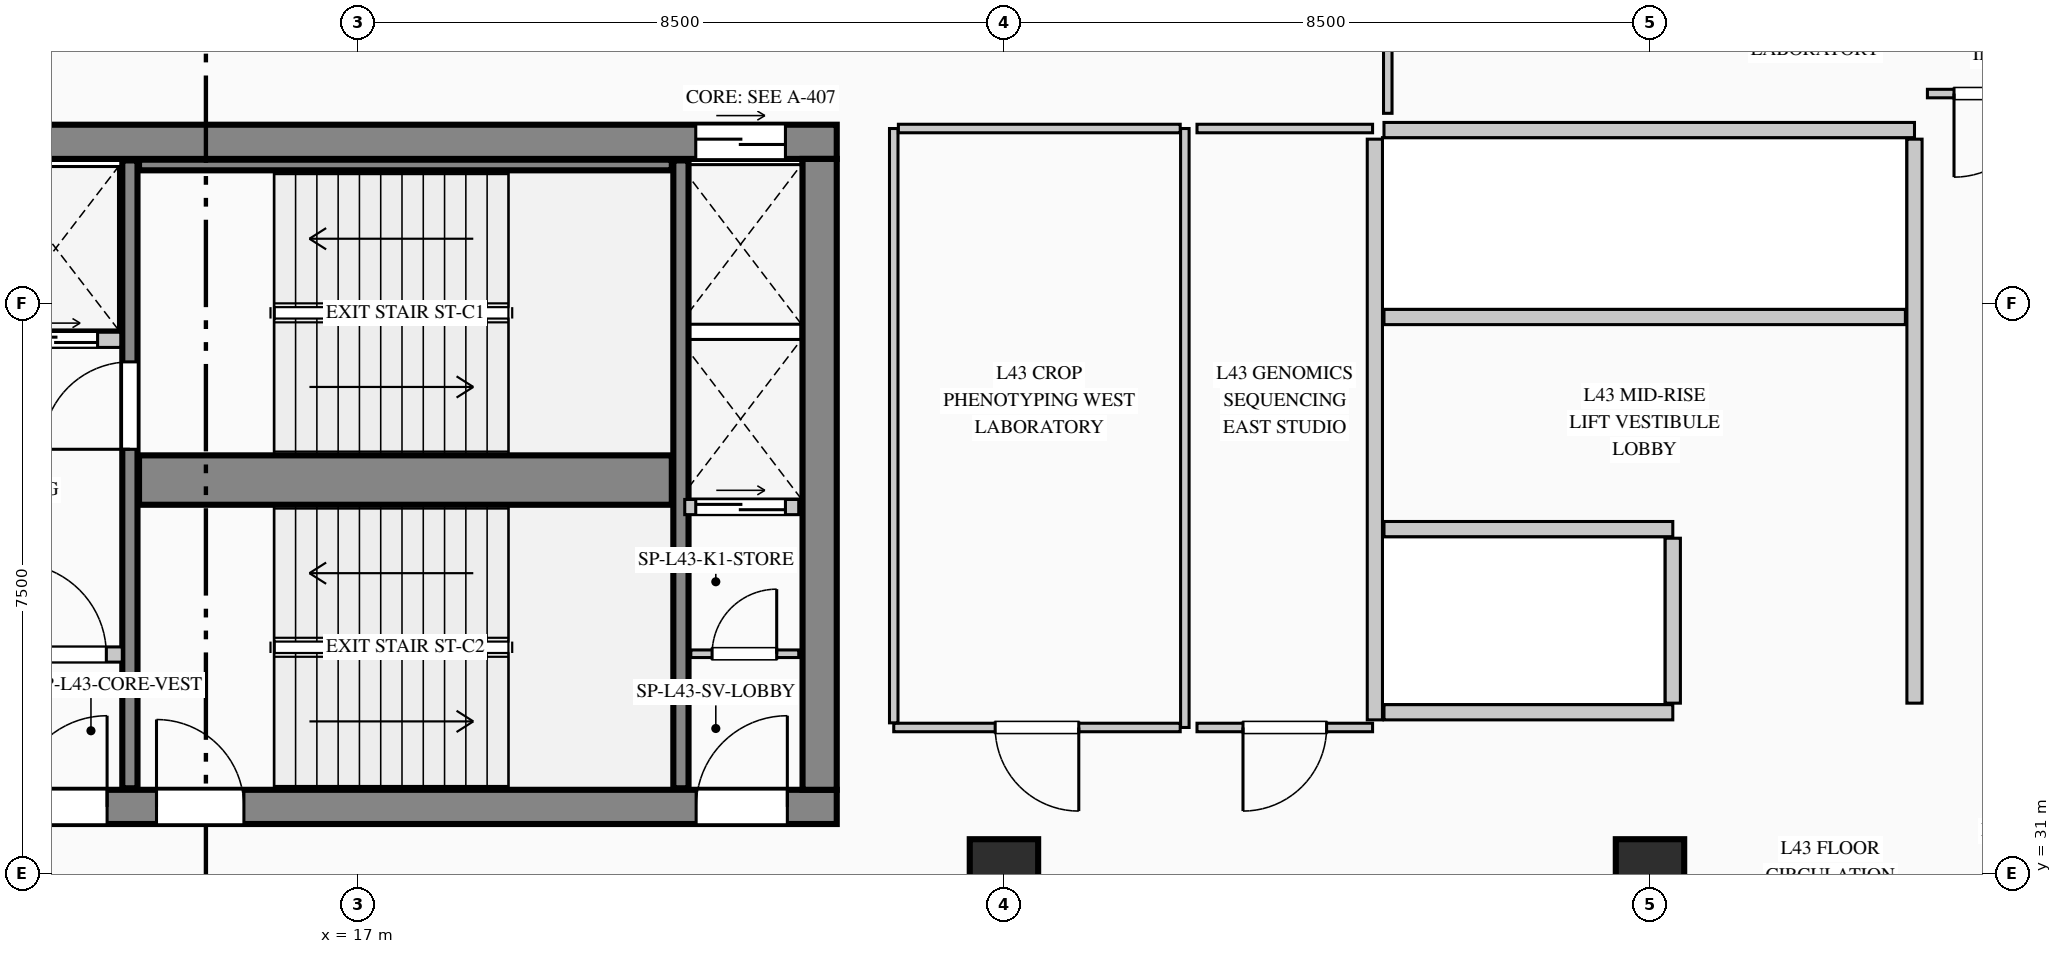
"""IFC4 building model, lengths in metres.
Left out: names, types, materials, properties, quantities, classifications, styles, units other than length and angle.
Written with IfcOpenShell. Run it as: python <this file> out.ifc"""

import sys

from ifc_helpers import new_model, si_unit, direction, frame, frame_2d, origin, origin_2d, place, context, subcontext, project, spatial, rectangle, extrude, element, fill, save


model = new_model("IFC4")
c1 = context("Model", 3, precision=1e-05, world=origin(), true_north=direction((0.0, 1.0)))
c2 = subcontext(c1, "Body", "Model", "MODEL_VIEW")
j1 = project(units=[si_unit("LENGTHUNIT", "METRE"), si_unit("PLANEANGLEUNIT", "RADIAN")], contexts=[c1])
p1 = place(None, origin())
s1 = spatial("IfcSite", under=j1, at=p1, CompositionType="ELEMENT")
p2 = place(p1, origin())
s2 = spatial("IfcBuilding", under=s1, at=p2, CompositionType="ELEMENT")
p3 = place(p2, frame((0.0, 0.0, 183.75)))
s3 = spatial("IfcBuildingStorey", under=s2, at=p3, CompositionType="ELEMENT", Elevation=183.75)
p4 = place(p3, frame((5.55, 40.625, 0.0), z_axis=(0.0, 0.0, 1.0), x_axis=(1.0, 0.0, 0.0)))
e1 = element("IfcWall", 1, at=p4, inside=s3, PredefinedType="SHEAR", context=c2, shape_type="SweptSolid", body=[
    extrude(rectangle(XDim=17.75, YDim=0.45, at=frame_2d((8.875, 0.0))), origin(), (0.0, 0.0, 1.0), 3.95),
])
p5 = place(p4, frame((15.895, 0.0, 0.0)))
e2 = element("IfcOpeningElement", 2, at=p5, cuts=e1, PredefinedType="OPENING", context=c2, shape_type="SweptSolid", body=[
    extrude(rectangle(XDim=1.18, YDim=2.25, at=frame_2d((0.59, 1.125))), frame((0.0, 0.235, 0.0), z_axis=(0.0, -1.0, 0.0), x_axis=(1.0, 0.0, 0.0)), (0.0, 0.0, 1.0), 0.47),
])
p6 = place(p3, frame((5.55, 31.875, 0.0), z_axis=(0.0, 0.0, 1.0), x_axis=(1.0, 0.0, 0.0)))
e3 = element("IfcWall", 3, at=p6, inside=s3, PredefinedType="SHEAR", context=c2, shape_type="SweptSolid", body=[
    extrude(rectangle(XDim=17.75, YDim=0.45, at=frame_2d((8.875, 0.0))), origin(), (0.0, 0.0, 1.0), 3.95),
])
p7 = place(p6, frame((3.1, 0.0, 0.0)))
e4 = element("IfcOpeningElement", 4, at=p7, cuts=e3, PredefinedType="OPENING", context=c2, shape_type="SweptSolid", body=[
    extrude(rectangle(XDim=1.2, YDim=2.2, at=frame_2d((0.6, 1.1))), frame((0.0, 0.235, 0.0), z_axis=(0.0, -1.0, 0.0), x_axis=(1.0, 0.0, 0.0)), (0.0, 0.0, 1.0), 0.47),
])
p8 = place(p6, frame((6.95, 0.0, 0.0)))
e5 = element("IfcOpeningElement", 5, at=p8, cuts=e3, PredefinedType="OPENING", context=c2, shape_type="SweptSolid", body=[
    extrude(rectangle(XDim=1.2, YDim=2.2, at=frame_2d((0.6, 1.1))), frame((0.0, 0.235, 0.0), z_axis=(0.0, -1.0, 0.0), x_axis=(1.0, 0.0, 0.0)), (0.0, 0.0, 1.0), 0.47),
])
p9 = place(p6, frame((8.8, 0.0, 0.0)))
e6 = element("IfcOpeningElement", 6, at=p9, cuts=e3, PredefinedType="OPENING", context=c2, shape_type="SweptSolid", body=[
    extrude(rectangle(XDim=1.15, YDim=2.2, at=frame_2d((0.575, 1.1))), frame((0.0, 0.235, 0.0), z_axis=(0.0, -1.0, 0.0), x_axis=(1.0, 0.0, 0.0)), (0.0, 0.0, 1.0), 0.47),
])
p10 = place(p6, frame((15.9, 0.0, 0.0)))
e7 = element("IfcOpeningElement", 7, at=p10, cuts=e3, PredefinedType="OPENING", context=c2, shape_type="SweptSolid", body=[
    extrude(rectangle(XDim=1.2, YDim=2.2, at=frame_2d((0.6, 1.1))), frame((0.0, 0.235, 0.0), z_axis=(0.0, -1.0, 0.0), x_axis=(1.0, 0.0, 0.0)), (0.0, 0.0, 1.0), 0.47),
])
p11 = place(p3, frame((23.075, 32.1, 0.0), z_axis=(0.0, 0.0, 1.0), x_axis=(0.0, 1.0, 0.0)))
e8 = element("IfcWall", 8, at=p11, inside=s3, PredefinedType="SHEAR", context=c2, shape_type="SweptSolid", body=[
    extrude(rectangle(XDim=8.3, YDim=0.45, at=frame_2d((4.15, 0.0))), origin(), (0.0, 0.0, 1.0), 3.95),
])
p12 = place(p3, frame((14.0, 32.12, 0.0), z_axis=(0.0, 0.0, 1.0), x_axis=(0.0, 1.0, 0.0)))
e9 = element("IfcWall", 9, at=p12, inside=s3, PredefinedType="SHEAR", context=c2, shape_type="SweptSolid", body=[
    extrude(rectangle(XDim=8.26, YDim=0.2, at=frame_2d((4.13, 0.0))), origin(), (0.0, 0.0, 1.0), 3.95),
])
p13 = place(p12, frame((4.46, 0.0, 0.0)))
e10 = element("IfcOpeningElement", 10, at=p13, cuts=e9, PredefinedType="OPENING", context=c2, shape_type="SweptSolid", body=[
    extrude(rectangle(XDim=1.15, YDim=2.2, at=frame_2d((0.575, 1.1))), frame((0.0, 0.11, 0.0), z_axis=(0.0, -1.0, 0.0), x_axis=(1.0, 0.0, 0.0)), (0.0, 0.0, 1.0), 0.22),
])
p14 = place(p3, frame((14.12, 36.175, 0.0), z_axis=(0.0, 0.0, 1.0), x_axis=(1.0, 0.0, 0.0)))
e11 = element("IfcWall", 11, at=p14, inside=s3, PredefinedType="SHEAR", context=c2, shape_type="SweptSolid", body=[
    extrude(rectangle(XDim=7.01, YDim=0.65, at=frame_2d((3.505, 0.0))), origin(), (0.0, 0.0, 1.0), 3.95),
])
p15 = place(p3, frame((21.25, 32.12, 0.0), z_axis=(0.0, 0.0, 1.0), x_axis=(0.0, 1.0, 0.0)))
e12 = element("IfcWall", 12, at=p15, inside=s3, PredefinedType="SHEAR", context=c2, shape_type="SweptSolid", body=[
    extrude(rectangle(XDim=8.26, YDim=0.2, at=frame_2d((4.13, 0.0))), origin(), (0.0, 0.0, 1.0), 3.95),
])
p16 = place(p3, frame((14.12, 40.32, 0.0), z_axis=(0.0, 0.0, 1.0), x_axis=(1.0, 0.0, 0.0)))
e13 = element("IfcWall", 13, at=p16, inside=s3, PredefinedType="SHEAR", context=c2, shape_type="SweptSolid", body=[
    extrude(rectangle(XDim=7.01, YDim=0.14, at=frame_2d((3.505, 0.0))), origin(), (0.0, 0.0, 1.0), 3.95),
])
for number, where, z_axis, x_axis in (
    (14, (25.5, 31.0, 0.0), (0.0, 0.0, 1.0), (1.0, 0.0, 0.0)),
    (15, (34.0, 31.0, 0.0), (0.0, 0.0, 1.0), (1.0, 0.0, 0.0)),
):
    element("IfcColumn", number, at=place(p3, frame(where, z_axis=z_axis, x_axis=x_axis)), inside=s3, PredefinedType="COLUMN", context=c2, shape_type="SweptSolid", body=[
        extrude(rectangle(XDim=0.9, YDim=0.9, at=origin_2d()), origin(), (0.0, 0.0, 1.0), 3.95),
    ])
p17 = place(p3, frame((10.34, 38.02, 0.0), z_axis=(0.0, 0.0, 1.0), x_axis=(1.0, 0.0, 0.0)))
e16 = element("IfcWall", 16, at=p17, inside=s3, PredefinedType="PARTITIONING", context=c2, shape_type="SweptSolid", body=[
    extrude(rectangle(XDim=3.54, YDim=0.2, at=frame_2d((1.77, 0.0))), origin(), (0.0, 0.0, 1.0), 3.7),
])
p18 = place(p17, frame((0.285, 0.0, 0.0)))
e17 = element("IfcOpeningElement", 17, at=p18, cuts=e16, PredefinedType="OPENING", context=c2, shape_type="SweptSolid", body=[
    extrude(rectangle(XDim=1.1, YDim=2.2, at=frame_2d((0.55, 1.1))), frame((0.0, 0.11, 0.0), z_axis=(0.0, -1.0, 0.0), x_axis=(1.0, 0.0, 0.0)), (0.0, 0.0, 1.0), 0.22),
])
p19 = place(p17, frame((2.135, 0.0, 0.0)))
e18 = element("IfcOpeningElement", 18, at=p19, cuts=e16, PredefinedType="OPENING", context=c2, shape_type="SweptSolid", body=[
    extrude(rectangle(XDim=1.1, YDim=2.2, at=frame_2d((0.55, 1.1))), frame((0.0, 0.11, 0.0), z_axis=(0.0, -1.0, 0.0), x_axis=(1.0, 0.0, 0.0)), (0.0, 0.0, 1.0), 0.22),
])
p20 = place(p3, frame((10.34, 33.88, 0.0), z_axis=(0.0, 0.0, 1.0), x_axis=(1.0, 0.0, 0.0)))
e19 = element("IfcWall", 19, at=p20, inside=s3, PredefinedType="PARTITIONING", context=c2, shape_type="SweptSolid", body=[
    extrude(rectangle(XDim=3.56, YDim=0.2, at=frame_2d((1.78, 0.0))), origin(), (0.0, 0.0, 1.0), 3.7),
])
p21 = place(p20, frame((2.15, 0.0, 0.0)))
e20 = element("IfcOpeningElement", 20, at=p21, cuts=e19, PredefinedType="OPENING", context=c2, shape_type="SweptSolid", body=[
    extrude(rectangle(XDim=1.2, YDim=2.2, at=frame_2d((0.6, 1.1))), frame((0.0, 0.11, 0.0), z_axis=(0.0, -1.0, 0.0), x_axis=(1.0, 0.0, 0.0)), (0.0, 0.0, 1.0), 0.22),
])
p22 = place(p3, frame((21.38, 33.89, 0.0), z_axis=(0.0, 0.0, 1.0), x_axis=(1.0, 0.0, 0.0)))
e21 = element("IfcWall", 21, at=p22, inside=s3, PredefinedType="PARTITIONING", context=c2, shape_type="SweptSolid", body=[
    extrude(rectangle(XDim=1.42, YDim=0.1, at=frame_2d((0.71, 0.0))), origin(), (0.0, 0.0, 1.0), 3.7),
])
p23 = place(p22, frame((0.28, 0.0, 0.0)))
e22 = element("IfcOpeningElement", 22, at=p23, cuts=e21, PredefinedType="OPENING", context=c2, shape_type="SweptSolid", body=[
    extrude(rectangle(XDim=0.85, YDim=2.1, at=frame_2d((0.425, 1.05))), frame((0.0, 0.06, 0.0), z_axis=(0.0, -1.0, 0.0), x_axis=(1.0, 0.0, 0.0)), (0.0, 0.0, 1.0), 0.12),
])
p24 = place(p3, frame((21.3, 35.82, 0.0), z_axis=(0.0, 0.0, 1.0), x_axis=(1.0, 0.0, 0.0)))
e23 = element("IfcWall", 23, at=p24, inside=s3, PredefinedType="PARTITIONING", context=c2, shape_type="SweptSolid", body=[
    extrude(rectangle(XDim=1.5, YDim=0.2, at=frame_2d((0.75, 0.0))), origin(), (0.0, 0.0, 1.0), 3.7),
])
p25 = place(p24, frame((0.145, 0.0, 0.0)))
e24 = element("IfcOpeningElement", 24, at=p25, cuts=e23, PredefinedType="OPENING", context=c2, shape_type="SweptSolid", body=[
    extrude(rectangle(XDim=1.18, YDim=2.25, at=frame_2d((0.59, 1.125))), frame((0.0, 0.11, 0.0), z_axis=(0.0, -1.0, 0.0), x_axis=(1.0, 0.0, 0.0)), (0.0, 0.0, 1.0), 0.22),
])
p26 = place(p3, frame((30.38, 33.02, 0.0), z_axis=(0.0, 0.0, 1.0), x_axis=(0.0, 1.0, 0.0)))
e25 = element("IfcWall", 25, at=p26, inside=s3, PredefinedType="PARTITIONING", context=c2, shape_type="SweptSolid", body=[
    extrude(rectangle(XDim=7.64, YDim=0.2, at=frame_2d((3.82, 0.0))), origin(), (0.0, 0.0, 1.0), 3.7),
])
p27 = place(p3, frame((30.5, 40.78, 0.0), z_axis=(0.0, 0.0, 1.0), x_axis=(1.0, 0.0, 0.0)))
e26 = element("IfcWall", 26, at=p27, inside=s3, PredefinedType="PARTITIONING", context=c2, shape_type="SweptSolid", body=[
    extrude(rectangle(XDim=6.98, YDim=0.2, at=frame_2d((3.49, 0.0))), origin(), (0.0, 0.0, 1.0), 3.7),
])
p28 = place(p3, frame((37.48, 33.24, 0.0), z_axis=(0.0, 0.0, 1.0), x_axis=(0.0, 1.0, 0.0)))
e27 = element("IfcWall", 27, at=p28, inside=s3, PredefinedType="PARTITIONING", context=c2, shape_type="SweptSolid", body=[
    extrude(rectangle(XDim=7.42, YDim=0.2, at=frame_2d((3.71, 0.0))), origin(), (0.0, 0.0, 1.0), 3.7),
])
p29 = place(p3, frame((30.5, 38.32, 0.0), z_axis=(0.0, 0.0, 1.0), x_axis=(1.0, 0.0, 0.0)))
e28 = element("IfcWall", 28, at=p29, inside=s3, PredefinedType="PARTITIONING", context=c2, shape_type="SweptSolid", body=[
    extrude(rectangle(XDim=6.86, YDim=0.2, at=frame_2d((3.43, 0.0))), origin(), (0.0, 0.0, 1.0), 3.7),
])
for number, where, z_axis, x_axis in (
    (29, (30.5, 35.53, 0.0), (0.0, 0.0, 1.0), (1.0, 0.0, 0.0)),
    (30, (30.5, 33.12, 0.0), (0.0, 0.0, 1.0), (1.0, 0.0, 0.0)),
):
    element("IfcWall", number, at=place(p3, frame(where, z_axis=z_axis, x_axis=x_axis)), inside=s3, PredefinedType="PARTITIONING", context=c2, shape_type="SweptSolid", body=[
        extrude(rectangle(XDim=3.8, YDim=0.2, at=frame_2d((1.9, 0.0))), origin(), (0.0, 0.0, 1.0), 3.7),
    ])
p30 = place(p3, frame((34.3, 33.24, 0.0), z_axis=(0.0, 0.0, 1.0), x_axis=(0.0, 1.0, 0.0)))
e31 = element("IfcWall", 31, at=p30, inside=s3, PredefinedType="PARTITIONING", context=c2, shape_type="SweptSolid", body=[
    extrude(rectangle(XDim=2.17, YDim=0.2, at=frame_2d((1.085, 0.0))), origin(), (0.0, 0.0, 1.0), 3.7),
])
p31 = place(p3, frame((27.88, 40.8, 0.0), z_axis=(0.0, 0.0, 1.0), x_axis=(0.0, -1.0, 0.0)))
e32 = element("IfcWall", 32, at=p31, inside=s3, PredefinedType="PARTITIONING", context=c2, shape_type="SweptSolid", body=[
    extrude(rectangle(XDim=7.88, YDim=0.112, at=frame_2d((3.94, 0.0))), origin(), (0.0, 0.0, 1.0), 3.7),
])
p32 = place(p3, frame((27.819, 32.92, 0.0), z_axis=(0.0, 0.0, 1.0), x_axis=(-1.0, 0.0, 0.0)))
e33 = element("IfcWall", 33, at=p32, inside=s3, PredefinedType="PARTITIONING", context=c2, shape_type="SweptSolid", body=[
    extrude(rectangle(XDim=3.769, YDim=0.112, at=frame_2d((1.885, 0.0))), origin(), (0.0, 0.0, 1.0), 3.7),
])
p33 = place(p32, frame((1.334, 0.0, 0.0)))
e34 = element("IfcOpeningElement", 34, at=p33, cuts=e33, PredefinedType="OPENING", context=c2, shape_type="SweptSolid", body=[
    extrude(rectangle(XDim=1.1, YDim=2.2, at=frame_2d((0.55, 1.1))), frame((0.0, 0.066, 0.0), z_axis=(0.0, -1.0, 0.0), x_axis=(1.0, 0.0, 0.0)), (0.0, 0.0, 1.0), 0.132),
])
p34 = place(p3, frame((24.05, 32.981, 0.0), z_axis=(0.0, 0.0, 1.0), x_axis=(0.0, 1.0, 0.0)))
e35 = element("IfcWall", 35, at=p34, inside=s3, PredefinedType="PARTITIONING", context=c2, shape_type="SweptSolid", body=[
    extrude(rectangle(XDim=7.819, YDim=0.112, at=frame_2d((3.91, 0.0))), origin(), (0.0, 0.0, 1.0), 3.7),
])
p35 = place(p3, frame((24.111, 40.8, 0.0), z_axis=(0.0, 0.0, 1.0), x_axis=(1.0, 0.0, 0.0)))
e36 = element("IfcWall", 36, at=p35, inside=s3, PredefinedType="PARTITIONING", context=c2, shape_type="SweptSolid", body=[
    extrude(rectangle(XDim=3.708, YDim=0.112, at=frame_2d((1.854, 0.0))), origin(), (0.0, 0.0, 1.0), 3.7),
])
p36 = place(p3, frame((30.35, 32.92, 0.0), z_axis=(0.0, 0.0, 1.0), x_axis=(-1.0, 0.0, 0.0)))
e37 = element("IfcWall", 37, at=p36, inside=s3, PredefinedType="PARTITIONING", context=c2, shape_type="SweptSolid", body=[
    extrude(rectangle(XDim=2.31, YDim=0.112, at=frame_2d((1.155, 0.0))), origin(), (0.0, 0.0, 1.0), 3.7),
])
p37 = place(p36, frame((0.605, 0.0, 0.0)))
e38 = element("IfcOpeningElement", 38, at=p37, cuts=e37, PredefinedType="OPENING", context=c2, shape_type="SweptSolid", body=[
    extrude(rectangle(XDim=1.1, YDim=2.2, at=frame_2d((0.55, 1.1))), frame((0.0, 0.066, 0.0), z_axis=(0.0, -1.0, 0.0), x_axis=(1.0, 0.0, 0.0)), (0.0, 0.0, 1.0), 0.132),
])
p38 = place(p3, frame((28.04, 40.8, 0.0), z_axis=(0.0, 0.0, 1.0), x_axis=(1.0, 0.0, 0.0)))
e39 = element("IfcWall", 39, at=p38, inside=s3, PredefinedType="PARTITIONING", context=c2, shape_type="SweptSolid", body=[
    extrude(rectangle(XDim=2.31, YDim=0.112, at=frame_2d((1.155, 0.0))), origin(), (0.0, 0.0, 1.0), 3.7),
])
p39 = place(p3, frame((39.45, 41.26, 0.0), z_axis=(0.0, 0.0, 1.0), x_axis=(-1.0, 0.0, 0.0)))
e40 = element("IfcWall", 40, at=p39, inside=s3, PredefinedType="PARTITIONING", context=c2, shape_type="SweptSolid", body=[
    extrude(rectangle(XDim=1.8, YDim=0.112, at=frame_2d((0.9, 0.0))), origin(), (0.0, 0.0, 1.0), 3.7),
])
p40 = place(p39, frame((0.35, 0.0, 0.0)))
e41 = element("IfcOpeningElement", 41, at=p40, cuts=e40, PredefinedType="OPENING", context=c2, shape_type="SweptSolid", body=[
    extrude(rectangle(XDim=1.1, YDim=2.2, at=frame_2d((0.55, 1.1))), frame((0.0, 0.066, 0.0), z_axis=(0.0, -1.0, 0.0), x_axis=(1.0, 0.0, 0.0)), (0.0, 0.0, 1.0), 0.132),
])
p41 = place(p3, frame((30.55, 41.0, 0.0), z_axis=(0.0, 0.0, 1.0), x_axis=(0.0, 1.0, 0.0)))
e42 = element("IfcWall", 42, at=p41, inside=s3, PredefinedType="PARTITIONING", context=c2, shape_type="SweptSolid", body=[
    extrude(rectangle(XDim=2.235, YDim=0.112, at=frame_2d((1.118, 0.0))), origin(), (0.0, 0.0, 1.0), 3.7),
])
p42 = place(p8, origin())
e43 = element("IfcDoor", 43, at=p42, inside=s3, OperationType="SINGLE_SWING_RIGHT", PredefinedType="DOOR", context=c2, shape_type="SweptSolid", body=[
    extrude(rectangle(XDim=1.2, YDim=2.2, at=frame_2d((0.6, 1.1))), frame((0.0, 0.025, 0.0), z_axis=(0.0, -1.0, 0.0), x_axis=(1.0, 0.0, 0.0)), (0.0, 0.0, 1.0), 0.05),
])
fill(e5, e43)
p43 = place(p9, origin())
e44 = element("IfcDoor", 44, at=p43, inside=s3, OperationType="SINGLE_SWING_LEFT", PredefinedType="DOOR", context=c2, shape_type="SweptSolid", body=[
    extrude(rectangle(XDim=1.15, YDim=2.2, at=frame_2d((0.575, 1.1))), frame((0.0, 0.025, 0.0), z_axis=(0.0, -1.0, 0.0), x_axis=(1.0, 0.0, 0.0)), (0.0, 0.0, 1.0), 0.05),
])
fill(e6, e44)
p44 = place(p10, origin())
e45 = element("IfcDoor", 45, at=p44, inside=s3, OperationType="SINGLE_SWING_RIGHT", PredefinedType="DOOR", context=c2, shape_type="SweptSolid", body=[
    extrude(rectangle(XDim=1.2, YDim=2.2, at=frame_2d((0.6, 1.1))), frame((0.0, 0.025, 0.0), z_axis=(0.0, -1.0, 0.0), x_axis=(1.0, 0.0, 0.0)), (0.0, 0.0, 1.0), 0.05),
])
fill(e7, e45)
p45 = place(p21, origin())
e46 = element("IfcDoor", 46, at=p45, inside=s3, OperationType="SINGLE_SWING_LEFT", PredefinedType="DOOR", context=c2, shape_type="SweptSolid", body=[
    extrude(rectangle(XDim=1.2, YDim=2.2, at=frame_2d((0.6, 1.1))), frame((0.0, 0.025, 0.0), z_axis=(0.0, -1.0, 0.0), x_axis=(1.0, 0.0, 0.0)), (0.0, 0.0, 1.0), 0.05),
])
fill(e20, e46)
p46 = place(p23, origin())
e47 = element("IfcDoor", 47, at=p46, inside=s3, OperationType="SINGLE_SWING_RIGHT", PredefinedType="DOOR", context=c2, shape_type="SweptSolid", body=[
    extrude(rectangle(XDim=0.85, YDim=2.1, at=frame_2d((0.425, 1.05))), frame((0.0, 0.025, 0.0), z_axis=(0.0, -1.0, 0.0), x_axis=(1.0, 0.0, 0.0)), (0.0, 0.0, 1.0), 0.05),
])
fill(e22, e47)
p47 = place(p13, origin())
e48 = element("IfcDoor", 48, at=p47, inside=s3, OperationType="SINGLE_SWING_LEFT", PredefinedType="DOOR", context=c2, shape_type="SweptSolid", body=[
    extrude(rectangle(XDim=1.15, YDim=2.2, at=frame_2d((0.575, 1.1))), frame((0.0, 0.025, 0.0), z_axis=(0.0, -1.0, 0.0), x_axis=(1.0, 0.0, 0.0)), (0.0, 0.0, 1.0), 0.05),
])
fill(e10, e48)
p48 = place(p19, origin())
e49 = element("IfcDoor", 49, at=p48, inside=s3, OperationType="DOUBLE_DOOR_SLIDING", PredefinedType="DOOR", context=c2, shape_type="SweptSolid", body=[
    extrude(rectangle(XDim=1.1, YDim=2.2, at=frame_2d((0.55, 1.1))), frame((0.0, 0.025, 0.0), z_axis=(0.0, -1.0, 0.0), x_axis=(1.0, 0.0, 0.0)), (0.0, 0.0, 1.0), 0.05),
])
fill(e18, e49)
p49 = place(p5, origin())
e50 = element("IfcDoor", 50, at=p49, inside=s3, OperationType="DOUBLE_DOOR_SLIDING", PredefinedType="DOOR", context=c2, shape_type="SweptSolid", body=[
    extrude(rectangle(XDim=1.18, YDim=2.25, at=frame_2d((0.59, 1.125))), frame((0.0, 0.025, 0.0), z_axis=(0.0, -1.0, 0.0), x_axis=(1.0, 0.0, 0.0)), (0.0, 0.0, 1.0), 0.05),
])
fill(e2, e50)
p50 = place(p25, origin())
e51 = element("IfcDoor", 51, at=p50, inside=s3, OperationType="DOUBLE_DOOR_SLIDING", PredefinedType="DOOR", context=c2, shape_type="SweptSolid", body=[
    extrude(rectangle(XDim=1.18, YDim=2.25, at=frame_2d((0.59, 1.125))), frame((0.0, 0.025, 0.0), z_axis=(0.0, -1.0, 0.0), x_axis=(1.0, 0.0, 0.0)), (0.0, 0.0, 1.0), 0.05),
])
fill(e24, e51)
p51 = place(p33, origin())
e52 = element("IfcDoor", 52, at=p51, inside=s3, OperationType="SINGLE_SWING_LEFT", PredefinedType="DOOR", context=c2, shape_type="SweptSolid", body=[
    extrude(rectangle(XDim=1.1, YDim=2.2, at=frame_2d((0.55, 1.1))), frame((0.0, 0.025, 0.0), z_axis=(0.0, -1.0, 0.0), x_axis=(1.0, 0.0, 0.0)), (0.0, 0.0, 1.0), 0.05),
])
fill(e34, e52)
p52 = place(p37, origin())
e53 = element("IfcDoor", 53, at=p52, inside=s3, OperationType="SINGLE_SWING_RIGHT", PredefinedType="DOOR", context=c2, shape_type="SweptSolid", body=[
    extrude(rectangle(XDim=1.1, YDim=2.2, at=frame_2d((0.55, 1.1))), frame((0.0, 0.025, 0.0), z_axis=(0.0, -1.0, 0.0), x_axis=(1.0, 0.0, 0.0)), (0.0, 0.0, 1.0), 0.05),
])
fill(e38, e53)
p53 = place(p40, origin())
e54 = element("IfcDoor", 54, at=p53, inside=s3, OperationType="SINGLE_SWING_RIGHT", PredefinedType="DOOR", context=c2, shape_type="SweptSolid", body=[
    extrude(rectangle(XDim=1.1, YDim=2.2, at=frame_2d((0.55, 1.1))), frame((0.0, 0.025, 0.0), z_axis=(0.0, -1.0, 0.0), x_axis=(1.0, 0.0, 0.0)), (0.0, 0.0, 1.0), 0.05),
])
fill(e41, e54)
save(model, sys.argv[1])
